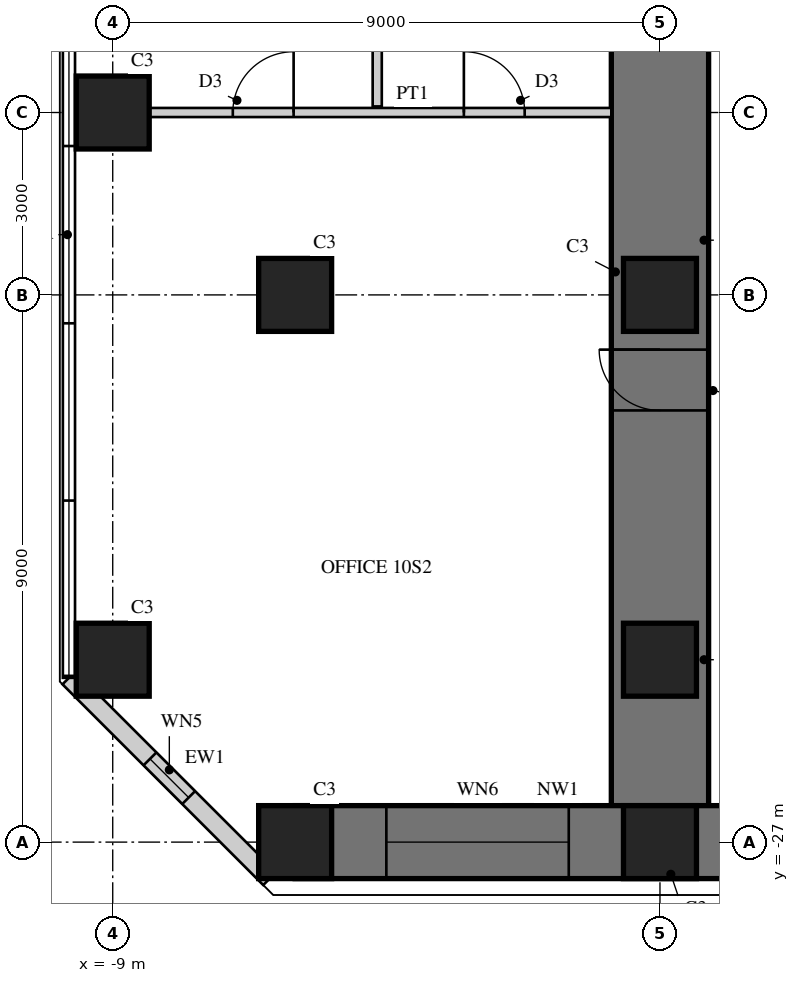
"""IFC4 building model, lengths in metres.
Left out: names, types, materials, properties, quantities, classifications, styles, units other than length and angle.
Written with IfcOpenShell. Run it as: python <this file> out.ifc"""

import sys

from ifc_helpers import new_model, si_unit, direction, frame, frame_2d, origin, origin_2d, place, context, subcontext, project, spatial, rectangle, hollow_rectangle, extrude, element, fill, save


model = new_model("IFC4")
c1 = context("Model", 3, precision=1e-05, world=origin(), true_north=direction((0.0, 1.0)))
c2 = subcontext(c1, "Body", "Model", "MODEL_VIEW")
j1 = project(units=[si_unit("LENGTHUNIT", "METRE"), si_unit("PLANEANGLEUNIT", "RADIAN")], contexts=[c1])
p1 = place(None, origin())
s1 = spatial("IfcSite", under=j1, at=p1, CompositionType="ELEMENT")
p2 = place(p1, origin())
s2 = spatial("IfcBuilding", under=s1, at=p2, CompositionType="ELEMENT")
p3 = place(p2, frame((0.0, 0.0, 43.5)))
s3 = spatial("IfcBuildingStorey", under=s2, at=p3, CompositionType="ELEMENT", Elevation=43.5)
p4 = place(p3, frame((0.0, -9.0, 0.0), z_axis=(0.0, 0.0, 1.0), x_axis=(0.0, -1.0, 0.0)))
e1 = element("IfcWall", 1, at=p4, inside=s3, PredefinedType="SHEAR", context=c2, shape_type="SweptSolid", body=[
    extrude(rectangle(XDim=18.0, YDim=1.6, at=frame_2d((9.0, 0.0))), origin(), (0.0, 0.0, 1.0), 4.0),
])
p5 = place(p4, frame((9.9, 0.0, 0.0)))
e2 = element("IfcOpeningElement", 2, at=p5, cuts=e1, PredefinedType="OPENING", context=c2, shape_type="SweptSolid", body=[
    extrude(rectangle(XDim=1.0, YDim=2.2, at=frame_2d((0.5, 1.1))), frame((0.0, 0.81, 0.0), z_axis=(0.0, -1.0, 0.0), x_axis=(1.0, 0.0, 0.0)), (0.0, 0.0, 1.0), 1.62),
])
p6 = place(p3, frame((-6.0, -27.0, 0.0), z_axis=(0.0, 0.0, 1.0), x_axis=(1.0, 0.0, 0.0)))
e3 = element("IfcWall", 3, at=p6, inside=s3, PredefinedType="SHEAR", context=c2, shape_type="SweptSolid", body=[
    extrude(rectangle(XDim=12.0, YDim=1.2, at=frame_2d((6.0, 0.0))), origin(), (0.0, 0.0, 1.0), 4.0),
])
p7 = place(p6, frame((1.5, 0.0, 0.6)))
e4 = element("IfcOpeningElement", 4, at=p7, cuts=e3, PredefinedType="OPENING", context=c2, shape_type="SweptSolid", body=[
    extrude(rectangle(XDim=3.0, YDim=2.4, at=frame_2d((1.5, 1.2))), frame((0.0, 0.61, 0.0), z_axis=(0.0, -1.0, 0.0), x_axis=(1.0, 0.0, 0.0)), (0.0, 0.0, 1.0), 1.22),
])
p8 = place(p6, frame((7.5, 0.0, 0.6)))
e5 = element("IfcOpeningElement", 5, at=p8, cuts=e3, PredefinedType="OPENING", context=c2, shape_type="SweptSolid", body=[
    extrude(rectangle(XDim=3.0, YDim=2.4, at=frame_2d((1.5, 1.2))), frame((0.0, 0.61, 0.0), z_axis=(0.0, -1.0, 0.0), x_axis=(1.0, 0.0, 0.0)), (0.0, 0.0, 1.0), 1.22),
])
for number, where, z_axis, x_axis in (
    (6, (-9.0, -15.0, 0.0), (0.0, 0.0, 1.0), (1.0, 0.0, 0.0)),
    (7, (-9.0, -24.0, 0.0), (0.0, 0.0, 1.0), (1.0, 0.0, 0.0)),
    (8, (-6.0, -27.0, 0.0), (0.0, 0.0, 1.0), (1.0, 0.0, 0.0)),
    (9, (0.0, -27.0, 0.0), (0.0, 0.0, 1.0), (1.0, 0.0, 0.0)),
    (10, (-6.0, -18.0, 0.0), (0.0, 0.0, 1.0), (1.0, 0.0, 0.0)),
    (11, (0.0, -18.0, 0.0), (0.0, 0.0, 1.0), (1.0, 0.0, 0.0)),
    (12, (0.0, -24.0, 0.0), (0.0, 0.0, 1.0), (1.0, 0.0, 0.0)),
):
    element("IfcColumn", number, at=place(p3, frame(where, z_axis=z_axis, x_axis=x_axis)), inside=s3, PredefinedType="COLUMN", context=c2, shape_type="SweptSolid", body=[
        extrude(rectangle(XDim=1.2, YDim=1.2, at=origin_2d()), origin(), (0.0, 0.0, 1.0), 4.0),
    ])
p9 = place(p3, frame((-9.72, -24.298, 0.0), z_axis=(0.0, 0.0, 1.0), x_axis=(0.707106781187, -0.707106781187, 0.0)))
e13 = element("IfcWall", 13, at=p9, inside=s3, PredefinedType="SOLIDWALL", context=c2, shape_type="SweptSolid", body=[
    extrude(rectangle(XDim=4.669, YDim=0.3, at=frame_2d((2.335, 0.0))), origin(), (0.0, 0.0, 1.0), 3.8),
])
p10 = place(p9, frame((1.885, 0.0, 0.3)))
e14 = element("IfcOpeningElement", 14, at=p10, cuts=e13, PredefinedType="OPENING", context=c2, shape_type="SweptSolid", body=[
    extrude(rectangle(XDim=0.9, YDim=2.4, at=frame_2d((0.45, 1.2))), frame((0.0, 0.16, 0.0), z_axis=(0.0, -1.0, 0.0), x_axis=(1.0, 0.0, 0.0)), (0.0, 0.0, 1.0), 0.32),
])
p11 = place(p3, frame((-8.4, -15.0, 0.0), z_axis=(0.0, 0.0, 1.0), x_axis=(1.0, 0.0, 0.0)))
e15 = element("IfcWall", 15, at=p11, inside=s3, PredefinedType="PARTITIONING", context=c2, shape_type="SweptSolid", body=[
    extrude(rectangle(XDim=7.6, YDim=0.15, at=frame_2d((3.8, 0.0))), origin(), (0.0, 0.0, 1.0), 2.95),
])
p12 = place(p11, frame((1.375, 0.0, 0.0)))
e16 = element("IfcOpeningElement", 16, at=p12, cuts=e15, PredefinedType="OPENING", context=c2, shape_type="SweptSolid", body=[
    extrude(rectangle(XDim=1.0, YDim=2.1, at=frame_2d((0.5, 1.05))), frame((0.0, 0.085, 0.0), z_axis=(0.0, -1.0, 0.0), x_axis=(1.0, 0.0, 0.0)), (0.0, 0.0, 1.0), 0.17),
])
p13 = place(p11, frame((5.175, 0.0, 0.0)))
e17 = element("IfcOpeningElement", 17, at=p13, cuts=e15, PredefinedType="OPENING", context=c2, shape_type="SweptSolid", body=[
    extrude(rectangle(XDim=1.0, YDim=2.1, at=frame_2d((0.5, 1.05))), frame((0.0, 0.085, 0.0), z_axis=(0.0, -1.0, 0.0), x_axis=(1.0, 0.0, 0.0)), (0.0, 0.0, 1.0), 0.17),
])
p14 = place(p3, frame((-4.65, -9.65, 0.0), z_axis=(0.0, 0.0, 1.0), x_axis=(0.0, -1.0, 0.0)))
e18 = element("IfcWall", 18, at=p14, inside=s3, PredefinedType="PARTITIONING", context=c2, shape_type="SweptSolid", body=[
    extrude(rectangle(XDim=5.25, YDim=0.15, at=frame_2d((2.625, 0.0))), origin(), (0.0, 0.0, 1.0), 3.8),
])
p15 = place(p10, origin())
e19 = element("IfcWindow", 19, at=p15, inside=s3, PartitioningType="SINGLE_PANEL", PredefinedType="WINDOW", context=c2, shape_type="SweptSolid", body=[
    extrude(hollow_rectangle(XDim=0.9, YDim=2.4, WallThickness=0.06, at=frame_2d((0.45, 1.2))), frame((0.0, 0.03, 0.0), z_axis=(0.0, -1.0, 0.0), x_axis=(1.0, 0.0, 0.0)), (0.0, 0.0, 1.0), 0.06),
    extrude(rectangle(XDim=0.779, YDim=2.279, at=frame_2d((0.45, 1.2))), frame((0.0, 0.03, 0.0), z_axis=(0.0, -1.0, 0.0), x_axis=(1.0, 0.0, 0.0)), (0.0, 0.0, 1.0), 0.06),
])
fill(e14, e19)
p16 = place(p7, origin())
e20 = element("IfcWindow", 20, at=p16, inside=s3, PartitioningType="SINGLE_PANEL", PredefinedType="WINDOW", context=c2, shape_type="SweptSolid", body=[
    extrude(hollow_rectangle(XDim=3.0, YDim=2.4, WallThickness=0.06, at=frame_2d((1.5, 1.2))), frame((0.0, 0.03, 0.0), z_axis=(0.0, -1.0, 0.0), x_axis=(1.0, 0.0, 0.0)), (0.0, 0.0, 1.0), 0.06),
    extrude(rectangle(XDim=2.879, YDim=2.279, at=frame_2d((1.5, 1.2))), frame((0.0, 0.03, 0.0), z_axis=(0.0, -1.0, 0.0), x_axis=(1.0, 0.0, 0.0)), (0.0, 0.0, 1.0), 0.06),
])
fill(e4, e20)
p17 = place(p12, origin())
e21 = element("IfcDoor", 21, at=p17, inside=s3, OperationType="SINGLE_SWING_RIGHT", PredefinedType="DOOR", context=c2, shape_type="SweptSolid", body=[
    extrude(rectangle(XDim=1.0, YDim=2.1, at=frame_2d((0.5, 1.05))), frame((0.0, 0.025, 0.0), z_axis=(0.0, -1.0, 0.0), x_axis=(1.0, 0.0, 0.0)), (0.0, 0.0, 1.0), 0.05),
])
fill(e16, e21)
p18 = place(p13, origin())
e22 = element("IfcDoor", 22, at=p18, inside=s3, OperationType="SINGLE_SWING_LEFT", PredefinedType="DOOR", context=c2, shape_type="SweptSolid", body=[
    extrude(rectangle(XDim=1.0, YDim=2.1, at=frame_2d((0.5, 1.05))), frame((0.0, 0.025, 0.0), z_axis=(0.0, -1.0, 0.0), x_axis=(1.0, 0.0, 0.0)), (0.0, 0.0, 1.0), 0.05),
])
fill(e17, e22)
p19 = place(p5, frame((1.0, 0.0, 0.0), z_axis=(0.0, 0.0, 1.0), x_axis=(-1.0, 0.0, 0.0)))
e23 = element("IfcDoor", 23, at=p19, inside=s3, OperationType="SINGLE_SWING_RIGHT", PredefinedType="DOOR", context=c2, shape_type="SweptSolid", body=[
    extrude(rectangle(XDim=1.0, YDim=2.2, at=frame_2d((0.5, 1.1))), frame((0.0, 0.025, 0.0), z_axis=(0.0, -1.0, 0.0), x_axis=(1.0, 0.0, 0.0)), (0.0, 0.0, 1.0), 0.05),
])
fill(e2, e23)
save(model, sys.argv[1])
